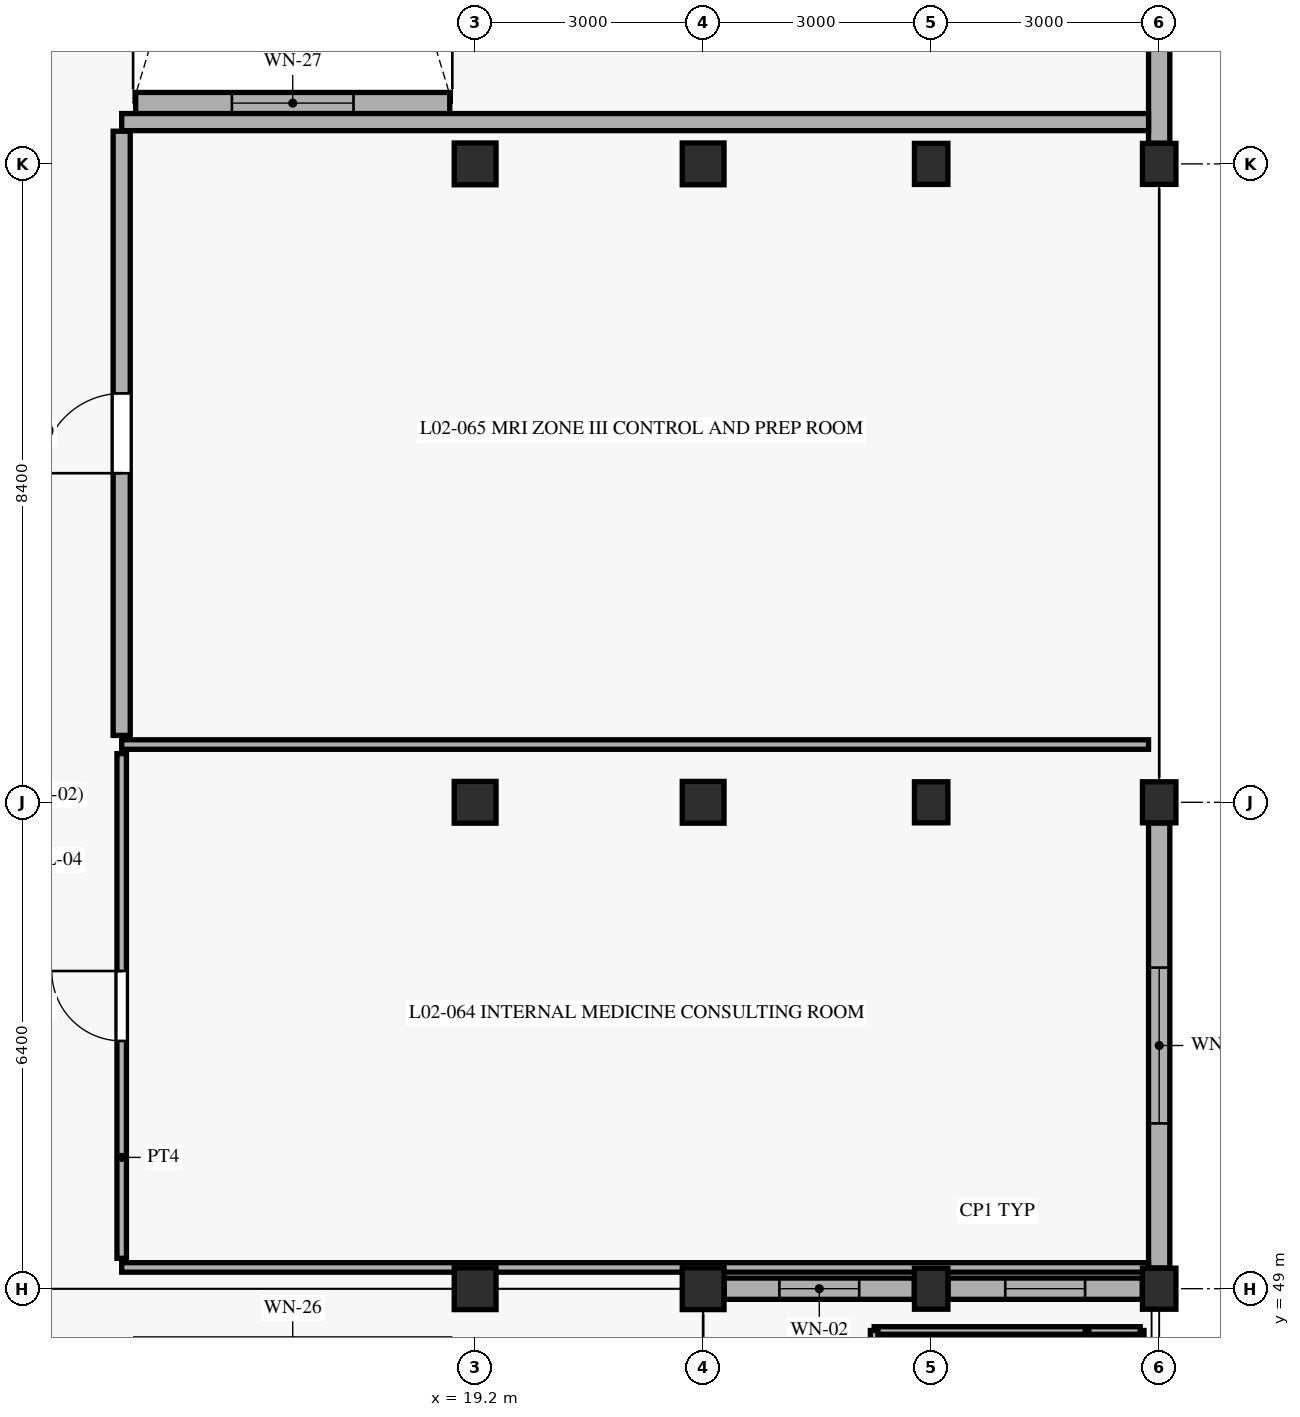
"""IFC4 building model, lengths in metres.
Left out: names, types, materials, properties, quantities, classifications, styles, units other than length and angle.
Written with IfcOpenShell. Run it as: python <this file> out.ifc"""

import sys

from ifc_helpers import new_model, si_unit, direction, frame, frame_2d, origin, origin_with_axes, origin_2d, place, context, subcontext, project, spatial, rectangle, extrude, element, fill, save


model = new_model("IFC4")
c1 = context("Model", 3, precision=1e-05, world=origin(), true_north=direction((0.0, 1.0)))
c2 = subcontext(c1, "Body", "Model", "MODEL_VIEW")
j1 = project(units=[si_unit("LENGTHUNIT", "METRE"), si_unit("PLANEANGLEUNIT", "RADIAN")], contexts=[c1])
p1 = place(None, origin())
s1 = spatial("IfcSite", under=j1, at=p1, CompositionType="ELEMENT")
p2 = place(p1, origin())
s2 = spatial("IfcBuilding", under=s1, at=p2, CompositionType="ELEMENT")
p3 = place(p2, frame((0.0, 0.0, 4.8)))
s3 = spatial("IfcBuildingStorey", under=s2, at=p3, CompositionType="ELEMENT", Elevation=4.8)
for number, where, z_axis, x_axis in (
    (1, (19.2, 49.0, 0.0), (0.0, 0.0, 1.0), (1.0, 0.0, 0.0)),
    (2, (19.2, 55.4, 0.0), (0.0, 0.0, 1.0), (1.0, 0.0, 0.0)),
    (3, (19.2, 63.8, 0.0), (0.0, 0.0, 1.0), (1.0, 0.0, 0.0)),
    (4, (22.2, 49.0, 0.0), (0.0, 0.0, 1.0), (1.0, 0.0, 0.0)),
    (5, (22.2, 55.4, 0.0), (0.0, 0.0, 1.0), (1.0, 0.0, 0.0)),
    (6, (22.2, 63.8, 0.0), (0.0, 0.0, 1.0), (1.0, 0.0, 0.0)),
):
    element("IfcColumn", number, at=place(p3, frame(where, z_axis=z_axis, x_axis=x_axis)), inside=s3, PredefinedType="COLUMN", context=c2, shape_type="SweptSolid", body=[
        extrude(rectangle(XDim=0.55, YDim=0.55, at=origin_2d()), origin(), (0.0, 0.0, 1.0), 4.5),
    ])
for number, where, z_axis, x_axis in (
    (7, (25.2, 49.0, 0.0), (0.0, 0.0, 1.0), (1.0, 0.0, 0.0)),
    (8, (25.2, 55.4, 0.0), (0.0, 0.0, 1.0), (1.0, 0.0, 0.0)),
    (9, (25.2, 63.8, 0.0), (0.0, 0.0, 1.0), (1.0, 0.0, 0.0)),
    (10, (28.2, 49.0, 0.0), (0.0, 0.0, 1.0), (1.0, 0.0, 0.0)),
    (11, (28.2, 55.4, 0.0), (0.0, 0.0, 1.0), (1.0, 0.0, 0.0)),
    (12, (28.2, 63.8, 0.0), (0.0, 0.0, 1.0), (1.0, 0.0, 0.0)),
):
    element("IfcColumn", number, at=place(p3, frame(where, z_axis=z_axis, x_axis=x_axis)), inside=s3, PredefinedType="PILASTER", context=c2, shape_type="SweptSolid", body=[
        extrude(rectangle(XDim=0.44, YDim=0.54, at=origin_2d()), origin(), (0.0, 0.0, 1.0), 4.5),
    ])
p4 = place(p3, frame((28.2, 49.272, 0.0), z_axis=(0.0, 0.0, 1.0), x_axis=(0.0, 1.0, 0.0)))
e13 = element("IfcWall", 13, at=p4, inside=s3, PredefinedType="SOLIDWALL", context=c2, shape_type="SweptSolid", body=[
    extrude(rectangle(XDim=5.856, YDim=0.28, at=frame_2d((2.928, 0.0))), origin(), (0.0, 0.0, 1.0), 3.79),
])
p5 = place(p4, frame((1.903, 0.0, 0.8)))
e14 = element("IfcOpeningElement", 14, at=p5, cuts=e13, PredefinedType="OPENING", context=c2, shape_type="SweptSolid", body=[
    extrude(rectangle(XDim=2.05, YDim=1.95, at=frame_2d((1.025, 0.975))), frame((0.0, 0.15, 0.0), z_axis=(0.0, -1.0, 0.0), x_axis=(1.0, 0.0, 0.0)), (0.0, 0.0, 1.0), 0.3),
])
p6 = place(p3, frame((28.2, 64.072, 0.0), z_axis=(0.0, 0.0, 1.0), x_axis=(0.0, 1.0, 0.0)))
e15 = element("IfcWall", 15, at=p6, inside=s3, PredefinedType="SOLIDWALL", context=c2, shape_type="SweptSolid", body=[
    extrude(rectangle(XDim=7.856, YDim=0.28, at=frame_2d((3.928, 0.0))), origin(), (0.0, 0.0, 1.0), 3.79),
])
p7 = place(p6, frame((2.903, 0.0, 0.8)))
e16 = element("IfcOpeningElement", 16, at=p7, cuts=e15, PredefinedType="OPENING", context=c2, shape_type="SweptSolid", body=[
    extrude(rectangle(XDim=2.05, YDim=1.95, at=frame_2d((1.025, 0.975))), frame((0.0, 0.15, 0.0), z_axis=(0.0, -1.0, 0.0), x_axis=(1.0, 0.0, 0.0)), (0.0, 0.0, 1.0), 0.3),
])
p8 = place(p3, frame((22.477, 49.0, 0.0), z_axis=(0.0, 0.0, 1.0), x_axis=(1.0, 0.0, 0.0)))
e17 = element("IfcWall", 17, at=p8, inside=s3, PredefinedType="SOLIDWALL", context=c2, shape_type="SweptSolid", body=[
    extrude(rectangle(XDim=2.501, YDim=0.28, at=frame_2d((1.25, 0.0))), origin(), (0.0, 0.0, 1.0), 3.89),
])
p9 = place(p8, frame((0.726, 0.0, 0.88)))
e18 = element("IfcOpeningElement", 18, at=p9, cuts=e17, PredefinedType="OPENING", context=c2, shape_type="SweptSolid", body=[
    extrude(rectangle(XDim=1.05, YDim=2.2, at=frame_2d((0.525, 1.1))), frame((0.0, 0.15, 0.0), z_axis=(0.0, -1.0, 0.0), x_axis=(1.0, 0.0, 0.0)), (0.0, 0.0, 1.0), 0.3),
])
p10 = place(p3, frame((25.422, 49.0, 0.0), z_axis=(0.0, 0.0, 1.0), x_axis=(1.0, 0.0, 0.0)))
e19 = element("IfcWall", 19, at=p10, inside=s3, PredefinedType="SOLIDWALL", context=c2, shape_type="SweptSolid", body=[
    extrude(rectangle(XDim=2.556, YDim=0.28, at=frame_2d((1.278, 0.0))), origin(), (0.0, 0.0, 1.0), 3.89),
])
p11 = place(p10, frame((0.753, 0.0, 0.88)))
e20 = element("IfcOpeningElement", 20, at=p11, cuts=e19, PredefinedType="OPENING", context=c2, shape_type="SweptSolid", body=[
    extrude(rectangle(XDim=1.05, YDim=2.2, at=frame_2d((0.525, 1.1))), frame((0.0, 0.15, 0.0), z_axis=(0.0, -1.0, 0.0), x_axis=(1.0, 0.0, 0.0)), (0.0, 0.0, 1.0), 0.3),
])
p12 = place(p3, frame((18.866, 64.6, 0.0), z_axis=(0.0, 0.0, 1.0), x_axis=(-1.0, 0.0, 0.0)))
e21 = element("IfcWall", 21, at=p12, inside=s3, PredefinedType="SOLIDWALL", context=c2, shape_type="SweptSolid", body=[
    extrude(rectangle(XDim=4.132, YDim=0.28, at=frame_2d((2.066, 0.0))), origin(), (0.0, 0.0, 1.0), 4.2),
])
p13 = place(p12, frame((1.266, 0.0, 0.85)))
e22 = element("IfcOpeningElement", 22, at=p13, cuts=e21, PredefinedType="OPENING", context=c2, shape_type="SweptSolid", body=[
    extrude(rectangle(XDim=1.6, YDim=1.8, at=frame_2d((0.8, 0.9))), frame((0.0, 0.15, 0.0), z_axis=(0.0, -1.0, 0.0), x_axis=(1.0, 0.0, 0.0)), (0.0, 0.0, 1.0), 0.3),
])
p14 = place(p3, frame((27.95, 4.75, 0.0), z_axis=(0.0, 0.0, 1.0), x_axis=(0.0, 1.0, 0.0)))
e23 = element("IfcWall", 23, at=p14, inside=s3, PredefinedType="PARAPET", context=c2, shape_type="SweptSolid", body=[
    extrude(rectangle(XDim=43.7, YDim=0.1, at=frame_2d((21.85, 0.0))), origin(), (0.0, 0.0, 1.0), 0.38),
])
p15 = place(p3, frame((27.95, 48.45, 0.0), z_axis=(0.0, 0.0, 1.0), x_axis=(-1.0, 0.0, 0.0)))
e24 = element("IfcWall", 24, at=p15, inside=s3, PredefinedType="PARAPET", context=c2, shape_type="SweptSolid", body=[
    extrude(rectangle(XDim=3.5, YDim=0.1, at=frame_2d((1.75, 0.0))), origin(), (0.0, 0.0, 1.0), 0.38),
])
p16 = place(p3, frame((24.45, 48.45, 0.0), z_axis=(0.0, 0.0, 1.0), x_axis=(0.0, -1.0, 0.0)))
e25 = element("IfcWall", 25, at=p16, inside=s3, PredefinedType="PARAPET", context=c2, shape_type="SweptSolid", body=[
    extrude(rectangle(XDim=43.7, YDim=0.1, at=frame_2d((21.85, 0.0))), origin(), (0.0, 0.0, 1.0), 0.38),
])
p17 = place(p3, frame((14.55, 49.4, 0.0), z_axis=(0.0, 0.0, 1.0), x_axis=(0.0, 1.0, 0.0)))
e26 = element("IfcWall", 26, at=p17, inside=s3, PredefinedType="PARTITIONING", context=c2, shape_type="SweptSolid", body=[
    extrude(rectangle(XDim=6.64, YDim=0.125, at=frame_2d((3.32, 0.0))), origin(), (0.0, 0.0, 1.0), 3.795),
])
p18 = place(p17, frame((2.86, 0.0, 0.0)))
e27 = element("IfcOpeningElement", 27, at=p18, cuts=e26, PredefinedType="OPENING", context=c2, shape_type="SweptSolid", body=[
    extrude(rectangle(XDim=0.92, YDim=2.15, at=frame_2d((0.46, 1.075))), frame((0.0, 0.073, 0.0), z_axis=(0.0, -1.0, 0.0), x_axis=(1.0, 0.0, 0.0)), (0.0, 0.0, 1.0), 0.145),
])
for number, where, z_axis, x_axis in (
    (28, (14.55, 49.28, 0.0), (0.0, 0.0, 1.0), (1.0, 0.0, 0.0)),
    (29, (14.55, 56.16, 0.0), (0.0, 0.0, 1.0), (1.0, 0.0, 0.0)),
):
    element("IfcWall", number, at=place(p3, frame(where, z_axis=z_axis, x_axis=x_axis)), inside=s3, PredefinedType="PARTITIONING", context=c2, shape_type="SweptSolid", body=[
        extrude(rectangle(XDim=13.51, YDim=0.125, at=frame_2d((6.755, 0.0))), origin(), (0.0, 0.0, 1.0), 3.735),
    ])
p19 = place(p3, frame((14.55, 56.28, 0.0), z_axis=(0.0, 0.0, 1.0), x_axis=(0.0, 1.0, 0.0)))
e30 = element("IfcWall", 30, at=p19, inside=s3, PredefinedType="SOLIDWALL", context=c2, shape_type="SweptSolid", body=[
    extrude(rectangle(XDim=7.95, YDim=0.225, at=frame_2d((3.975, 0.0))), origin(), (0.0, 0.0, 1.0), 3.795),
])
p20 = place(p19, frame((3.45, 0.0, 0.0)))
e31 = element("IfcOpeningElement", 31, at=p20, cuts=e30, PredefinedType="OPENING", context=c2, shape_type="SweptSolid", body=[
    extrude(rectangle(XDim=1.05, YDim=2.24, at=frame_2d((0.525, 1.12))), frame((0.0, 0.123, 0.0), z_axis=(0.0, -1.0, 0.0), x_axis=(1.0, 0.0, 0.0)), (0.0, 0.0, 1.0), 0.245),
])
p21 = place(p3, frame((14.55, 64.35, 0.0), z_axis=(0.0, 0.0, 1.0), x_axis=(1.0, 0.0, 0.0)))
e32 = element("IfcWall", 32, at=p21, inside=s3, PredefinedType="SOLIDWALL", context=c2, shape_type="SweptSolid", body=[
    extrude(rectangle(XDim=13.51, YDim=0.225, at=frame_2d((6.755, 0.0))), origin(), (0.0, 0.0, 1.0), 3.735),
])
p22 = place(p5, origin_with_axes())
e33 = element("IfcWindow", 33, at=p22, inside=s3, PartitioningType="SINGLE_PANEL", PredefinedType="WINDOW", context=c2, shape_type="SweptSolid", body=[
    extrude(rectangle(XDim=2.05, YDim=1.95, at=frame_2d((1.025, 0.975))), frame((0.0, 0.03, 0.0), z_axis=(0.0, -1.0, 0.0), x_axis=(1.0, 0.0, 0.0)), (0.0, 0.0, 1.0), 0.06),
])
fill(e14, e33)
p23 = place(p9, origin_with_axes())
e34 = element("IfcWindow", 34, at=p23, inside=s3, PartitioningType="SINGLE_PANEL", PredefinedType="WINDOW", context=c2, shape_type="SweptSolid", body=[
    extrude(rectangle(XDim=1.05, YDim=2.2, at=frame_2d((0.525, 1.1))), frame((0.0, 0.03, 0.0), z_axis=(0.0, -1.0, 0.0), x_axis=(1.0, 0.0, 0.0)), (0.0, 0.0, 1.0), 0.06),
])
fill(e18, e34)
p24 = place(p11, origin_with_axes())
e35 = element("IfcWindow", 35, at=p24, inside=s3, PartitioningType="SINGLE_PANEL", PredefinedType="WINDOW", context=c2, shape_type="SweptSolid", body=[
    extrude(rectangle(XDim=1.05, YDim=2.2, at=frame_2d((0.525, 1.1))), frame((0.0, 0.03, 0.0), z_axis=(0.0, -1.0, 0.0), x_axis=(1.0, 0.0, 0.0)), (0.0, 0.0, 1.0), 0.06),
])
fill(e20, e35)
p25 = place(p13, origin_with_axes())
e36 = element("IfcWindow", 36, at=p25, inside=s3, PartitioningType="SINGLE_PANEL", PredefinedType="WINDOW", context=c2, shape_type="SweptSolid", body=[
    extrude(rectangle(XDim=1.6, YDim=1.8, at=frame_2d((0.8, 0.9))), frame((0.0, 0.03, 0.0), z_axis=(0.0, -1.0, 0.0), x_axis=(1.0, 0.0, 0.0)), (0.0, 0.0, 1.0), 0.06),
])
fill(e22, e36)
p26 = place(p18, frame((0.92, 0.0, 0.0), z_axis=(0.0, 0.0, 1.0), x_axis=(-1.0, 0.0, 0.0)))
e37 = element("IfcDoor", 37, at=p26, inside=s3, OperationType="SINGLE_SWING_LEFT", PredefinedType="DOOR", context=c2, shape_type="SweptSolid", body=[
    extrude(rectangle(XDim=0.92, YDim=2.15, at=frame_2d((0.46, 1.075))), frame((0.0, 0.025, 0.0), z_axis=(0.0, -1.0, 0.0), x_axis=(1.0, 0.0, 0.0)), (0.0, 0.0, 1.0), 0.05),
])
fill(e27, e37)
p27 = place(p20, frame((1.05, 0.0, 0.0), z_axis=(0.0, 0.0, 1.0), x_axis=(-1.0, 0.0, 0.0)))
e38 = element("IfcDoor", 38, at=p27, inside=s3, OperationType="SINGLE_SWING_RIGHT", PredefinedType="DOOR", context=c2, shape_type="SweptSolid", body=[
    extrude(rectangle(XDim=1.05, YDim=2.24, at=frame_2d((0.525, 1.12))), frame((0.0, 0.025, 0.0), z_axis=(0.0, -1.0, 0.0), x_axis=(1.0, 0.0, 0.0)), (0.0, 0.0, 1.0), 0.05),
])
fill(e31, e38)
save(model, sys.argv[1])
